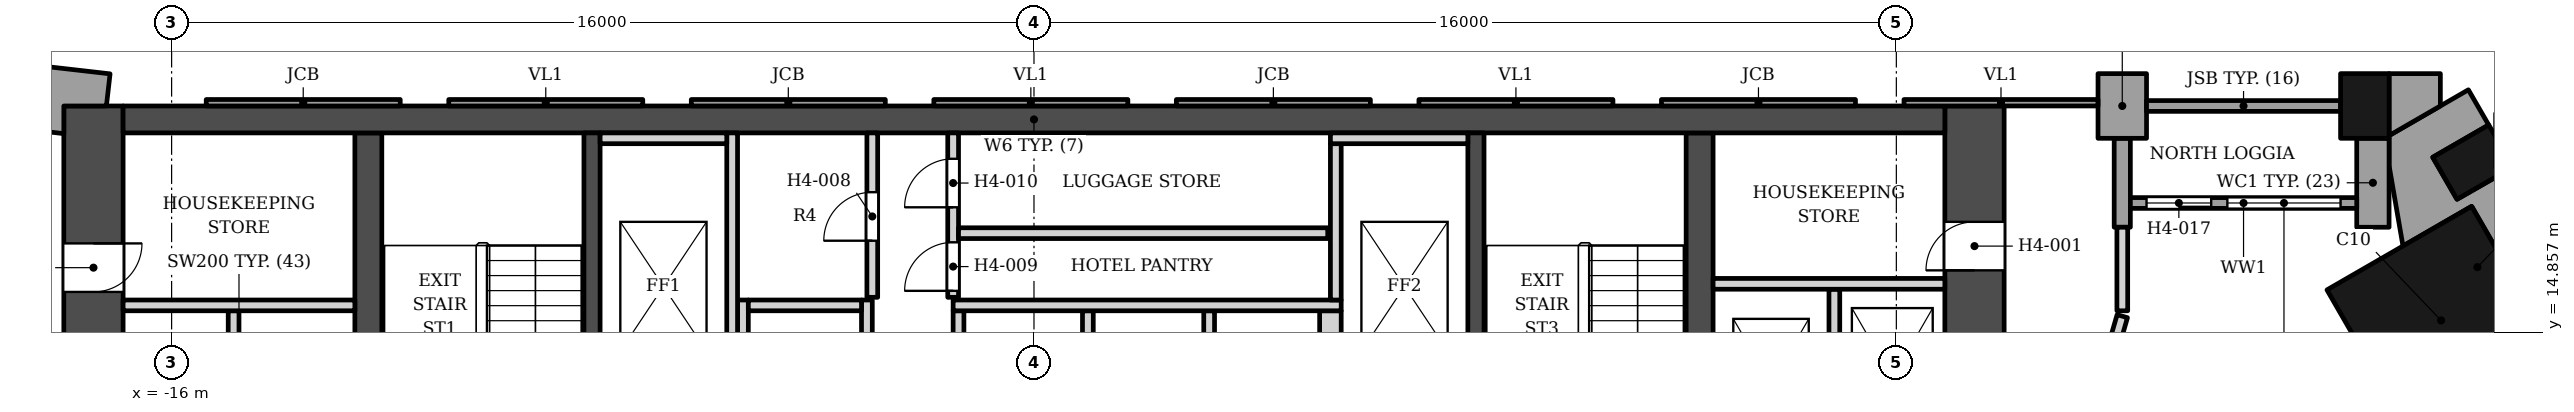
"""IFC4 building model, lengths in metres.
Left out: names, types, materials, properties, quantities, classifications, styles, units other than length and angle.
Written with IfcOpenShell. Run it as: python <this file> out.ifc"""

import sys

from ifc_helpers import new_model, si_unit, direction, frame, frame_2d, origin, origin_2d, place, context, subcontext, project, spatial, polyline, rectangle, outline, extrude, element, fill, save


model = new_model("IFC4")
c1 = context("Model", 3, precision=1e-05, world=origin(), true_north=direction((0.0, 1.0)))
c2 = subcontext(c1, "Body", "Model", "MODEL_VIEW")
j1 = project(units=[si_unit("LENGTHUNIT", "METRE"), si_unit("PLANEANGLEUNIT", "RADIAN")], contexts=[c1])
p1 = place(None, origin())
s1 = spatial("IfcSite", under=j1, at=p1, CompositionType="ELEMENT")
p2 = place(p1, origin())
s2 = spatial("IfcBuilding", under=s1, at=p2, CompositionType="ELEMENT")
p3 = place(p2, frame((0.0, 0.0, 76.6)))
s3 = spatial("IfcBuildingStorey", under=s2, at=p3, CompositionType="ELEMENT", Elevation=76.6)
p4 = place(p3, frame((-16.9, 18.802, 0.0), z_axis=(0.0, 0.0, 1.0), x_axis=(1.0, 0.0, 0.0)))
e1 = element("IfcWall", 1, at=p4, inside=s3, PredefinedType="SHEAR", context=c2, shape_type="SweptSolid", body=[
    extrude(rectangle(XDim=33.8, YDim=0.5, at=frame_2d((16.9, 0.0))), origin(), (0.0, 0.0, 1.0), 3.4),
])
p5 = place(p3, frame((-12.35, 5.253, 0.0), z_axis=(0.0, 0.0, 1.0), x_axis=(0.0, 1.0, 0.0)))
e2 = element("IfcWall", 2, at=p5, inside=s3, PredefinedType="SHEAR", context=c2, shape_type="SweptSolid", body=[
    extrude(rectangle(XDim=13.3, YDim=0.5, at=frame_2d((6.65, 0.0))), origin(), (0.0, 0.0, 1.0), 3.4),
])
p6 = place(p3, frame((-8.2, 5.253, 0.0), z_axis=(0.0, 0.0, 1.0), x_axis=(0.0, 1.0, 0.0)))
e3 = element("IfcWall", 3, at=p6, inside=s3, PredefinedType="SHEAR", context=c2, shape_type="SweptSolid", body=[
    extrude(rectangle(XDim=13.3, YDim=0.3, at=frame_2d((6.65, 0.0))), origin(), (0.0, 0.0, 1.0), 3.4),
])
p7 = place(p6, frame((7.1, 0.0, 0.0)))
e4 = element("IfcOpeningElement", 4, at=p7, cuts=e3, PredefinedType="OPENING", context=c2, shape_type="SweptSolid", body=[
    extrude(rectangle(XDim=1.4, YDim=2.1, at=frame_2d((0.7, 1.05))), frame((0.0, 0.16, 0.0), z_axis=(0.0, -1.0, 0.0), x_axis=(1.0, 0.0, 0.0)), (0.0, 0.0, 1.0), 0.32),
])
p8 = place(p6, frame((5.05, 0.0, 0.0)))
e5 = element("IfcOpeningElement", 5, at=p8, cuts=e3, PredefinedType="OPENING", context=c2, shape_type="SweptSolid", body=[
    extrude(rectangle(XDim=1.4, YDim=2.1, at=frame_2d((0.7, 1.05))), frame((0.0, 0.16, 0.0), z_axis=(0.0, -1.0, 0.0), x_axis=(1.0, 0.0, 0.0)), (0.0, 0.0, 1.0), 0.32),
])
p9 = place(p3, frame((12.35, 5.253, 0.0), z_axis=(0.0, 0.0, 1.0), x_axis=(0.0, 1.0, 0.0)))
e6 = element("IfcWall", 6, at=p9, inside=s3, PredefinedType="SHEAR", context=c2, shape_type="SweptSolid", body=[
    extrude(rectangle(XDim=13.3, YDim=0.5, at=frame_2d((6.65, 0.0))), origin(), (0.0, 0.0, 1.0), 3.4),
])
p10 = place(p3, frame((8.2, 5.253, 0.0), z_axis=(0.0, 0.0, 1.0), x_axis=(0.0, 1.0, 0.0)))
e7 = element("IfcWall", 7, at=p10, inside=s3, PredefinedType="SHEAR", context=c2, shape_type="SweptSolid", body=[
    extrude(rectangle(XDim=13.3, YDim=0.3, at=frame_2d((6.65, 0.0))), origin(), (0.0, 0.0, 1.0), 3.4),
])
p11 = place(p10, frame((7.1, 0.0, 0.0)))
e8 = element("IfcOpeningElement", 8, at=p11, cuts=e7, PredefinedType="OPENING", context=c2, shape_type="SweptSolid", body=[
    extrude(rectangle(XDim=1.4, YDim=2.1, at=frame_2d((0.7, 1.05))), frame((0.0, 0.16, 0.0), z_axis=(0.0, -1.0, 0.0), x_axis=(1.0, 0.0, 0.0)), (0.0, 0.0, 1.0), 0.32),
])
p12 = place(p10, frame((5.05, 0.0, 0.0)))
e9 = element("IfcOpeningElement", 9, at=p12, cuts=e7, PredefinedType="OPENING", context=c2, shape_type="SweptSolid", body=[
    extrude(rectangle(XDim=1.4, YDim=2.1, at=frame_2d((0.7, 1.05))), frame((0.0, 0.16, 0.0), z_axis=(0.0, -1.0, 0.0), x_axis=(1.0, 0.0, 0.0)), (0.0, 0.0, 1.0), 0.32),
])
p13 = place(p3, frame((-17.45, 5.853, 0.0), z_axis=(0.0, 0.0, 1.0), x_axis=(0.0, 1.0, 0.0)))
e10 = element("IfcWall", 10, at=p13, inside=s3, PredefinedType="SHEAR", context=c2, shape_type="SweptSolid", body=[
    extrude(rectangle(XDim=13.2, YDim=1.1, at=frame_2d((6.6, 0.0))), origin(), (0.0, 0.0, 1.0), 3.4),
])
p14 = place(p13, frame((4.1, 0.0, 0.0)))
e11 = element("IfcOpeningElement", 11, at=p14, cuts=e10, PredefinedType="OPENING", context=c2, shape_type="SweptSolid", body=[
    extrude(rectangle(XDim=1.6, YDim=2.1, at=frame_2d((0.8, 1.05))), frame((0.0, 0.56, 0.0), z_axis=(0.0, -1.0, 0.0), x_axis=(1.0, 0.0, 0.0)), (0.0, 0.0, 1.0), 1.12),
])
p15 = place(p13, frame((9.75, 0.0, 0.0)))
e12 = element("IfcOpeningElement", 12, at=p15, cuts=e10, PredefinedType="OPENING", context=c2, shape_type="SweptSolid", body=[
    extrude(rectangle(XDim=0.9, YDim=2.1, at=frame_2d((0.45, 1.05))), frame((0.0, 0.56, 0.0), z_axis=(0.0, -1.0, 0.0), x_axis=(1.0, 0.0, 0.0)), (0.0, 0.0, 1.0), 1.12),
])
p16 = place(p3, frame((17.45, 5.853, 0.0), z_axis=(0.0, 0.0, 1.0), x_axis=(0.0, 1.0, 0.0)))
e13 = element("IfcWall", 13, at=p16, inside=s3, PredefinedType="SHEAR", context=c2, shape_type="SweptSolid", body=[
    extrude(rectangle(XDim=13.2, YDim=1.1, at=frame_2d((6.6, 0.0))), origin(), (0.0, 0.0, 1.0), 3.4),
])
p17 = place(p16, frame((4.1, 0.0, 0.0)))
e14 = element("IfcOpeningElement", 14, at=p17, cuts=e13, PredefinedType="OPENING", context=c2, shape_type="SweptSolid", body=[
    extrude(rectangle(XDim=1.6, YDim=2.1, at=frame_2d((0.8, 1.05))), frame((0.0, 0.56, 0.0), z_axis=(0.0, -1.0, 0.0), x_axis=(1.0, 0.0, 0.0)), (0.0, 0.0, 1.0), 1.12),
])
p18 = place(p16, frame((10.15, 0.0, 0.0)))
e15 = element("IfcOpeningElement", 15, at=p18, cuts=e13, PredefinedType="OPENING", context=c2, shape_type="SweptSolid", body=[
    extrude(rectangle(XDim=0.9, YDim=2.1, at=frame_2d((0.45, 1.05))), frame((0.0, 0.56, 0.0), z_axis=(0.0, -1.0, 0.0), x_axis=(1.0, 0.0, 0.0)), (0.0, 0.0, 1.0), 1.12),
])
p19 = place(p3, frame((26.107, 15.073, 0.0), z_axis=(0.0, 0.0, 1.0), x_axis=(-0.866025447418, -0.499999924425, 0.0)))
e16 = element("IfcColumn", 16, at=p19, inside=s3, PredefinedType="COLUMN", context=c2, shape_type="SweptSolid", body=[
    extrude(rectangle(XDim=3.1, YDim=3.1, at=origin_2d()), origin(), (0.0, 0.0, 1.0), 3.4),
])
for number, where, z_axis, x_axis in (
    (17, (26.697, 18.011, 0.0), (0.0, 0.0, 1.0), (-0.5, 0.866, 0.0)),
    (18, (24.692, 19.053, 0.0), (0.0, 0.0, 1.0), (-1.0, 0.0, 0.0)),
):
    element("IfcColumn", number, at=place(p3, frame(where, z_axis=z_axis, x_axis=x_axis)), inside=s3, PredefinedType="COLUMN", context=c2, shape_type="SweptSolid", body=[
        extrude(rectangle(XDim=0.9, YDim=1.2, at=origin_2d()), origin(), (0.0, 0.0, 1.0), 3.4),
    ])
p20 = place(p3, origin())
e19 = element("IfcWall", 19, at=p20, inside=s3, PredefinedType="SOLIDWALL", context=c2, shape_type="SweptSolid", body=[
    extrude(outline(polyline([(25.142, 16.802), (25.142, 18.453), (24.542, 18.453), (24.542, 16.802), (25.142, 16.802)])), origin(), (0.0, 0.0, 1.0), 2.63),
])
p21 = place(p3, origin())
e20 = element("IfcWall", 20, at=p21, inside=s3, PredefinedType="SOLIDWALL", context=c2, shape_type="SweptSolid", body=[
    extrude(outline(polyline([(20.642, 19.653), (19.742, 19.653), (19.742, 18.453), (20.642, 18.453), (20.642, 19.653)])), origin(), (0.0, 0.0, 1.0), 2.65),
])
p22 = place(p3, origin())
e21 = element("IfcWall", 21, at=p22, inside=s3, PredefinedType="SOLIDWALL", context=c2, shape_type="SweptSolid", body=[
    extrude(outline(polyline([(20.042, 18.453), (20.042, 16.802), (20.342, 16.802), (20.342, 18.453), (20.042, 18.453)])), origin(), (0.0, 0.0, 1.0), 2.65),
])
p23 = place(p3, frame((24.242, 19.052, 0.0), z_axis=(0.0, 0.0, 1.0), x_axis=(-1.0, 0.0, 0.0)))
e22 = element("IfcWall", 22, at=p23, inside=s3, PredefinedType="SOLIDWALL", context=c2, shape_type="SweptSolid", body=[
    extrude(rectangle(XDim=3.6, YDim=0.2, at=frame_2d((1.8, 0.0))), origin(), (0.0, 0.0, 1.0), 2.65),
])
p24 = place(p3, frame((24.542, 17.252, 0.0), z_axis=(0.0, 0.0, 1.0), x_axis=(-1.0, 0.0, 0.0)))
e23 = element("IfcWall", 23, at=p24, inside=s3, PredefinedType="ELEMENTEDWALL", context=c2, shape_type="SweptSolid", body=[
    extrude(rectangle(XDim=4.2, YDim=0.2, at=frame_2d((2.1, 0.0))), origin(), (0.0, 0.0, 1.0), 2.65),
])
p25 = place(p24, frame((0.3, 0.0, 0.6)))
e24 = element("IfcOpeningElement", 24, at=p25, cuts=e23, PredefinedType="OPENING", context=c2, shape_type="SweptSolid", body=[
    extrude(rectangle(XDim=2.1, YDim=1.8, at=frame_2d((1.05, 0.9))), frame((0.0, 0.11, 0.0), z_axis=(0.0, -1.0, 0.0), x_axis=(1.0, 0.0, 0.0)), (0.0, 0.0, 1.0), 0.22),
])
p26 = place(p24, frame((2.7, 0.0, 0.0)))
e25 = element("IfcOpeningElement", 25, at=p26, cuts=e23, PredefinedType="OPENING", context=c2, shape_type="SweptSolid", body=[
    extrude(rectangle(XDim=1.2, YDim=2.4, at=frame_2d((0.6, 1.2))), frame((0.0, 0.11, 0.0), z_axis=(0.0, -1.0, 0.0), x_axis=(1.0, 0.0, 0.0)), (0.0, 0.0, 1.0), 0.22),
])
p27 = place(p3, origin())
e26 = element("IfcWall", 26, at=p27, inside=s3, PredefinedType="ELEMENTEDWALL", context=c2, shape_type="SweptSolid", body=[
    extrude(outline(polyline([(16.142, 19.173), (16.142, 19.052), (19.741, 19.052), (19.741, 19.173), (16.142, 19.173)])), origin(), (0.0, 0.0, 1.0), 2.65),
])
p28 = place(p3, origin())
e27 = element("IfcWall", 27, at=p28, inside=s3, PredefinedType="SOLIDWALL", context=c2, shape_type="SweptSolid", body=[
    extrude(outline(polyline([(11.642, 19.173), (11.642, 19.052), (15.242, 19.052), (15.242, 19.173), (11.642, 19.173)])), origin(), (0.0, 0.0, 1.0), 2.65),
])
p29 = place(p3, origin())
e28 = element("IfcWall", 28, at=p29, inside=s3, PredefinedType="ELEMENTEDWALL", context=c2, shape_type="SweptSolid", body=[
    extrude(outline(polyline([(7.142, 19.173), (7.142, 19.052), (10.742, 19.052), (10.742, 19.173), (7.142, 19.173)])), origin(), (0.0, 0.0, 1.0), 2.65),
])
p30 = place(p3, origin())
e29 = element("IfcWall", 29, at=p30, inside=s3, PredefinedType="SOLIDWALL", context=c2, shape_type="SweptSolid", body=[
    extrude(outline(polyline([(2.642, 19.173), (2.642, 19.052), (6.242, 19.052), (6.242, 19.173), (2.642, 19.173)])), origin(), (0.0, 0.0, 1.0), 2.65),
])
p31 = place(p3, origin())
e30 = element("IfcWall", 30, at=p31, inside=s3, PredefinedType="ELEMENTEDWALL", context=c2, shape_type="SweptSolid", body=[
    extrude(outline(polyline([(-1.858, 19.173), (-1.858, 19.052), (1.742, 19.052), (1.742, 19.173), (-1.858, 19.173)])), origin(), (0.0, 0.0, 1.0), 2.65),
])
p32 = place(p3, origin())
e31 = element("IfcWall", 31, at=p32, inside=s3, PredefinedType="SOLIDWALL", context=c2, shape_type="SweptSolid", body=[
    extrude(outline(polyline([(-6.358, 19.173), (-6.358, 19.052), (-2.758, 19.052), (-2.758, 19.173), (-6.358, 19.173)])), origin(), (0.0, 0.0, 1.0), 2.65),
])
p33 = place(p3, origin())
e32 = element("IfcWall", 32, at=p33, inside=s3, PredefinedType="ELEMENTEDWALL", context=c2, shape_type="SweptSolid", body=[
    extrude(outline(polyline([(-10.858, 19.173), (-10.858, 19.052), (-7.258, 19.052), (-7.258, 19.173), (-10.858, 19.173)])), origin(), (0.0, 0.0, 1.0), 2.65),
])
p34 = place(p3, origin())
e33 = element("IfcWall", 33, at=p34, inside=s3, PredefinedType="SOLIDWALL", context=c2, shape_type="SweptSolid", body=[
    extrude(outline(polyline([(-15.358, 19.173), (-15.358, 19.052), (-11.758, 19.052), (-11.758, 19.173), (-15.358, 19.173)])), origin(), (0.0, 0.0, 1.0), 2.65),
])
p35 = place(p3, origin())
e34 = element("IfcWall", 34, at=p35, inside=s3, PredefinedType="SOLIDWALL", context=c2, shape_type="SweptSolid", body=[
    extrude(outline(polyline([(26.674, 17.19), (28.224, 14.506), (26.95, 13.77), (27.353, 13.072), (27.901, 14.021), (28.51, 13.67), (28.202, 14.203), (29.24, 14.802), (27.444, 17.914), (26.402, 17.321), (25.952, 18.101), (26.99, 18.7), (26.613, 19.353), (25.054, 18.453), (25.142, 18.453), (25.142, 17.947), (25.4, 16.454), (26.674, 17.19)])), origin(), (0.0, 0.0, 1.0), 2.63),
])
p36 = place(p3, origin())
e35 = element("IfcWall", 35, at=p36, inside=s3, PredefinedType="SOLIDWALL", context=c2, shape_type="SweptSolid", body=[
    extrude(outline(polyline([(26.094, 19.653), (25.142, 19.653), (25.142, 18.503), (26.094, 19.052), (26.094, 19.653)])), origin(), (0.0, 0.0, 1.0), 2.63),
])
p37 = place(p3, origin())
e36 = element("IfcWall", 36, at=p37, inside=s3, PredefinedType="SOLIDWALL", context=c2, shape_type="SweptSolid", body=[
    extrude(outline(polyline([(-20.062, 19.983), (-20.198, 18.791), (-18.0, 18.539), (-18.0, 19.052), (-17.21, 19.052), (-17.142, 19.649), (-20.062, 19.983), (-20.062, 19.983), (-20.062, 19.983)])), origin(), (0.0, 0.0, 1.0), 2.473),
])
for number, where, z_axis, x_axis in (
    (37, (-5.4, 12.453, 0.0), (0.0, 0.0, 1.0), (0.0, 1.0, 0.0)),
    (38, (-3.1, 12.453, 0.0), (0.0, 0.0, 1.0), (0.0, 1.0, 0.0)),
):
    element("IfcWall", number, at=place(p3, frame(where, z_axis=z_axis, x_axis=x_axis)), inside=s3, PredefinedType="SOLIDWALL", context=c2, shape_type="SweptSolid", body=[
        extrude(rectangle(XDim=3.0, YDim=0.2, at=frame_2d((1.5, 0.0))), origin(), (0.0, 0.0, 1.0), 3.23),
    ])
for number, where, z_axis, x_axis in (
    (39, (-14.85, 12.653, 0.0), (0.0, 0.0, 1.0), (0.0, 1.0, 0.0)),
    (40, (-1.4, 12.653, 0.0), (0.0, 0.0, 1.0), (0.0, 1.0, 0.0)),
    (41, (1.0, 12.653, 0.0), (0.0, 0.0, 1.0), (0.0, 1.0, 0.0)),
    (42, (3.25, 12.653, 0.0), (0.0, 0.0, 1.0), (0.0, 1.0, 0.0)),
):
    element("IfcWall", number, at=place(p3, frame(where, z_axis=z_axis, x_axis=x_axis)), inside=s3, PredefinedType="SOLIDWALL", context=c2, shape_type="SweptSolid", body=[
        extrude(rectangle(XDim=2.6, YDim=0.2, at=frame_2d((1.3, 0.0))), origin(), (0.0, 0.0, 1.0), 3.23),
    ])
p38 = place(p3, frame((14.85, 12.653, 0.0), z_axis=(0.0, 0.0, 1.0), x_axis=(0.0, 1.0, 0.0)))
e43 = element("IfcWall", 43, at=p38, inside=s3, PredefinedType="SOLIDWALL", context=c2, shape_type="SweptSolid", body=[
    extrude(rectangle(XDim=3.0, YDim=0.2, at=frame_2d((1.5, 0.0))), origin(), (0.0, 0.0, 1.0), 3.23),
])
p39 = place(p3, frame((-5.6, 14.253, 0.0), z_axis=(0.0, 0.0, 1.0), x_axis=(0.0, 1.0, 0.0)))
e44 = element("IfcWall", 44, at=p39, inside=s3, PredefinedType="SOLIDWALL", context=c2, shape_type="SweptSolid", body=[
    extrude(rectangle(XDim=4.3, YDim=0.2, at=frame_2d((2.15, 0.0))), origin(), (0.0, 0.0, 1.0), 3.23),
])
p40 = place(p3, frame((5.5, 14.453, 0.0), z_axis=(0.0, 0.0, 1.0), x_axis=(0.0, 1.0, 0.0)))
e45 = element("IfcWall", 45, at=p40, inside=s3, PredefinedType="SOLIDWALL", context=c2, shape_type="SweptSolid", body=[
    extrude(rectangle(XDim=0.8, YDim=0.4, at=frame_2d((0.4, 0.0))), origin(), (0.0, 0.0, 1.0), 3.23),
])
p41 = place(p3, frame((-16.9, 15.353, 0.0), z_axis=(0.0, 0.0, 1.0), x_axis=(1.0, 0.0, 0.0)))
e46 = element("IfcWall", 46, at=p41, inside=s3, PredefinedType="SOLIDWALL", context=c2, shape_type="SweptSolid", body=[
    extrude(rectangle(XDim=4.3, YDim=0.2, at=frame_2d((2.15, 0.0))), origin(), (0.0, 0.0, 1.0), 3.23),
])
p42 = place(p3, frame((-5.3, 15.353, 0.0), z_axis=(0.0, 0.0, 1.0), x_axis=(1.0, 0.0, 0.0)))
e47 = element("IfcWall", 47, at=p42, inside=s3, PredefinedType="SOLIDWALL", context=c2, shape_type="SweptSolid", body=[
    extrude(rectangle(XDim=2.1, YDim=0.2, at=frame_2d((1.05, 0.0))), origin(), (0.0, 0.0, 1.0), 3.23),
])
p43 = place(p3, frame((-1.5, 15.353, 0.0), z_axis=(0.0, 0.0, 1.0), x_axis=(1.0, 0.0, 0.0)))
e48 = element("IfcWall", 48, at=p43, inside=s3, PredefinedType="SOLIDWALL", context=c2, shape_type="SweptSolid", body=[
    extrude(rectangle(XDim=7.2, YDim=0.2, at=frame_2d((3.6, 0.0))), origin(), (0.0, 0.0, 1.0), 3.23),
])
p44 = place(p3, frame((5.6, 15.453, 0.0), z_axis=(0.0, 0.0, 1.0), x_axis=(0.0, 1.0, 0.0)))
e49 = element("IfcWall", 49, at=p44, inside=s3, PredefinedType="SOLIDWALL", context=c2, shape_type="SweptSolid", body=[
    extrude(rectangle(XDim=2.9, YDim=0.2, at=frame_2d((1.45, 0.0))), origin(), (0.0, 0.0, 1.0), 3.23),
])
p45 = place(p3, frame((-3.0, 15.503, 0.0), z_axis=(0.0, 0.0, 1.0), x_axis=(0.0, 1.0, 0.0)))
e50 = element("IfcWall", 50, at=p45, inside=s3, PredefinedType="SOLIDWALL", context=c2, shape_type="SweptSolid", body=[
    extrude(rectangle(XDim=3.05, YDim=0.2, at=frame_2d((1.525, 0.0))), origin(), (0.0, 0.0, 1.0), 3.23),
])
p46 = place(p45, frame((1.05, 0.0, 0.0)))
e51 = element("IfcOpeningElement", 51, at=p46, cuts=e50, PredefinedType="OPENING", context=c2, shape_type="SweptSolid", body=[
    extrude(rectangle(XDim=0.9, YDim=2.1, at=frame_2d((0.45, 1.05))), frame((0.0, 0.11, 0.0), z_axis=(0.0, -1.0, 0.0), x_axis=(1.0, 0.0, 0.0)), (0.0, 0.0, 1.0), 0.22),
])
p47 = place(p3, frame((-1.5, 15.503, 0.0), z_axis=(0.0, 0.0, 1.0), x_axis=(0.0, 1.0, 0.0)))
e52 = element("IfcWall", 52, at=p47, inside=s3, PredefinedType="SOLIDWALL", context=c2, shape_type="SweptSolid", body=[
    extrude(rectangle(XDim=3.05, YDim=0.2, at=frame_2d((1.525, 0.0))), origin(), (0.0, 0.0, 1.0), 3.23),
])
p48 = place(p47, frame((0.12, 0.0, 0.0)))
e53 = element("IfcOpeningElement", 53, at=p48, cuts=e52, PredefinedType="OPENING", context=c2, shape_type="SweptSolid", body=[
    extrude(rectangle(XDim=0.9, YDim=2.1, at=frame_2d((0.45, 1.05))), frame((0.0, 0.11, 0.0), z_axis=(0.0, -1.0, 0.0), x_axis=(1.0, 0.0, 0.0)), (0.0, 0.0, 1.0), 0.22),
])
p49 = place(p47, frame((1.67, 0.0, 0.0)))
e54 = element("IfcOpeningElement", 54, at=p49, cuts=e52, PredefinedType="OPENING", context=c2, shape_type="SweptSolid", body=[
    extrude(rectangle(XDim=0.9, YDim=2.1, at=frame_2d((0.45, 1.05))), frame((0.0, 0.11, 0.0), z_axis=(0.0, -1.0, 0.0), x_axis=(1.0, 0.0, 0.0)), (0.0, 0.0, 1.0), 0.22),
])
p50 = place(p3, frame((12.6, 15.753, 0.0), z_axis=(0.0, 0.0, 1.0), x_axis=(1.0, 0.0, 0.0)))
e55 = element("IfcWall", 55, at=p50, inside=s3, PredefinedType="SOLIDWALL", context=c2, shape_type="SweptSolid", body=[
    extrude(rectangle(XDim=4.3, YDim=0.2, at=frame_2d((2.15, 0.0))), origin(), (0.0, 0.0, 1.0), 3.23),
])
p51 = place(p3, frame((-1.4, 16.693, 0.0), z_axis=(0.0, 0.0, 1.0), x_axis=(1.0, 0.0, 0.0)))
e56 = element("IfcWall", 56, at=p51, inside=s3, PredefinedType="SOLIDWALL", context=c2, shape_type="SweptSolid", body=[
    extrude(rectangle(XDim=6.85, YDim=0.2, at=frame_2d((3.425, 0.0))), origin(), (0.0, 0.0, 1.0), 3.23),
])
p52 = place(p3, frame((-8.05, 18.453, 0.0), z_axis=(0.0, 0.0, 1.0), x_axis=(1.0, 0.0, 0.0)))
e57 = element("IfcWall", 57, at=p52, inside=s3, PredefinedType="SOLIDWALL", context=c2, shape_type="SweptSolid", body=[
    extrude(rectangle(XDim=2.35, YDim=0.2, at=frame_2d((1.175, 0.0))), origin(), (0.0, 0.0, 1.0), 3.23),
])
p53 = place(p3, frame((5.5, 18.453, 0.0), z_axis=(0.0, 0.0, 1.0), x_axis=(1.0, 0.0, 0.0)))
e58 = element("IfcWall", 58, at=p53, inside=s3, PredefinedType="SOLIDWALL", context=c2, shape_type="SweptSolid", body=[
    extrude(rectangle(XDim=2.55, YDim=0.2, at=frame_2d((1.275, 0.0))), origin(), (0.0, 0.0, 1.0), 3.23),
])
p54 = place(p3, frame((19.728, 13.549, 0.0), z_axis=(0.0, 0.0, 1.0), x_axis=(0.277983512343, 0.960585845651, 0.0)))
e59 = element("IfcWall", 59, at=p54, inside=s3, PredefinedType="PARTITIONING", context=c2, shape_type="SweptSolid", body=[
    extrude(rectangle(XDim=1.67, YDim=0.2, at=frame_2d((0.835, 0.0))), origin(), (0.0, 0.0, 1.0), 3.23),
])
p55 = place(p3, frame((20.192, 15.252, 0.0), z_axis=(0.0, 0.0, 1.0), x_axis=(0.0, 1.0, 0.0)))
e60 = element("IfcWall", 60, at=p55, inside=s3, PredefinedType="PARTITIONING", context=c2, shape_type="SweptSolid", body=[
    extrude(rectangle(XDim=1.55, YDim=0.2, at=frame_2d((0.775, 0.0))), origin(), (0.0, 0.0, 1.0), 3.23),
])
p56 = place(p25, origin())
e61 = element("IfcWindow", 61, at=p56, inside=s3, PartitioningType="SINGLE_PANEL", PredefinedType="WINDOW", context=c2, shape_type="SweptSolid", body=[
    extrude(rectangle(XDim=2.1, YDim=1.8, at=frame_2d((1.05, 0.9))), frame((0.0, 0.03, 0.0), z_axis=(0.0, -1.0, 0.0), x_axis=(1.0, 0.0, 0.0)), (0.0, 0.0, 1.0), 0.06),
])
fill(e24, e61)
p57 = place(p26, origin())
e62 = element("IfcDoor", 62, at=p57, inside=s3, OperationType="SINGLE_SWING_LEFT", PredefinedType="DOOR", context=c2, shape_type="SweptSolid", body=[
    extrude(rectangle(XDim=1.2, YDim=2.4, at=frame_2d((0.6, 1.2))), frame((0.0, 0.025, 0.0), z_axis=(0.0, -1.0, 0.0), x_axis=(1.0, 0.0, 0.0)), (0.0, 0.0, 1.0), 0.05),
])
fill(e25, e62)
p58 = place(p46, origin())
e63 = element("IfcDoor", 63, at=p58, inside=s3, OperationType="SINGLE_SWING_LEFT", PredefinedType="DOOR", context=c2, shape_type="SweptSolid", body=[
    extrude(rectangle(XDim=0.9, YDim=2.1, at=frame_2d((0.45, 1.05))), frame((0.0, 0.025, 0.0), z_axis=(0.0, -1.0, 0.0), x_axis=(1.0, 0.0, 0.0)), (0.0, 0.0, 1.0), 0.05),
])
fill(e51, e63)
p59 = place(p48, origin())
e64 = element("IfcDoor", 64, at=p59, inside=s3, OperationType="SINGLE_SWING_LEFT", PredefinedType="DOOR", context=c2, shape_type="SweptSolid", body=[
    extrude(rectangle(XDim=0.9, YDim=2.1, at=frame_2d((0.45, 1.05))), frame((0.0, 0.025, 0.0), z_axis=(0.0, -1.0, 0.0), x_axis=(1.0, 0.0, 0.0)), (0.0, 0.0, 1.0), 0.05),
])
fill(e53, e64)
p60 = place(p49, origin())
e65 = element("IfcDoor", 65, at=p60, inside=s3, OperationType="SINGLE_SWING_LEFT", PredefinedType="DOOR", context=c2, shape_type="SweptSolid", body=[
    extrude(rectangle(XDim=0.9, YDim=2.1, at=frame_2d((0.45, 1.05))), frame((0.0, 0.025, 0.0), z_axis=(0.0, -1.0, 0.0), x_axis=(1.0, 0.0, 0.0)), (0.0, 0.0, 1.0), 0.05),
])
fill(e54, e65)
p61 = place(p15, origin())
e66 = element("IfcDoor", 66, at=p61, inside=s3, OperationType="SINGLE_SWING_RIGHT", PredefinedType="DOOR", context=c2, shape_type="SweptSolid", body=[
    extrude(rectangle(XDim=0.9, YDim=2.1, at=frame_2d((0.45, 1.05))), frame((0.0, -0.225, 0.0), z_axis=(0.0, -1.0, 0.0), x_axis=(1.0, 0.0, 0.0)), (0.0, 0.0, 1.0), 0.05),
])
fill(e12, e66)
p62 = place(p18, origin())
e67 = element("IfcDoor", 67, at=p62, inside=s3, OperationType="SINGLE_SWING_LEFT", PredefinedType="DOOR", context=c2, shape_type="SweptSolid", body=[
    extrude(rectangle(XDim=0.9, YDim=2.1, at=frame_2d((0.45, 1.05))), frame((0.0, 0.275, 0.0), z_axis=(0.0, -1.0, 0.0), x_axis=(1.0, 0.0, 0.0)), (0.0, 0.0, 1.0), 0.05),
])
fill(e15, e67)
save(model, sys.argv[1])
